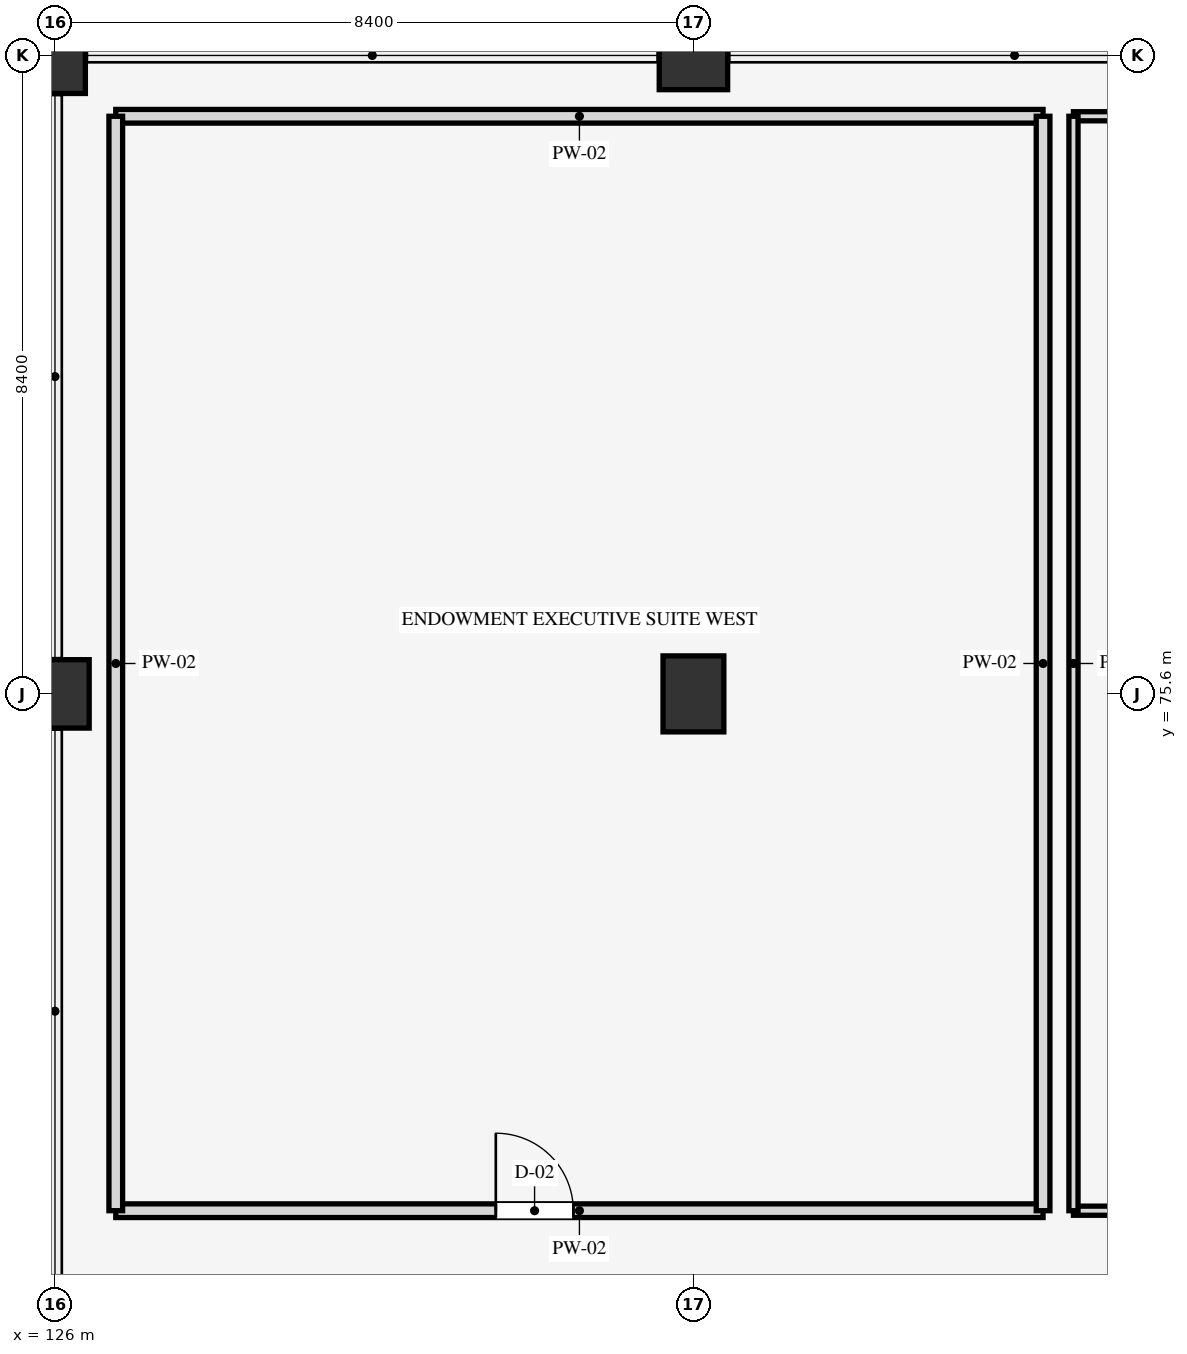
"""IFC4 building model, lengths in metres.
Left out: names, types, materials, properties, quantities, classifications, styles, units other than length and angle.
Written with IfcOpenShell. Run it as: python <this file> out.ifc"""

import sys

from ifc_helpers import new_model, si_unit, direction, frame, frame_2d, origin, origin_2d, place, context, subcontext, project, spatial, rectangle, extrude, element, fill, save


model = new_model("IFC4")
c1 = context("Model", 3, precision=1e-05, world=origin(), true_north=direction((0.0, 1.0)))
c2 = subcontext(c1, "Body", "Model", "MODEL_VIEW")
j1 = project(units=[si_unit("LENGTHUNIT", "METRE"), si_unit("PLANEANGLEUNIT", "RADIAN")], contexts=[c1])
p1 = place(None, origin())
s1 = spatial("IfcSite", under=j1, at=p1, CompositionType="ELEMENT")
p2 = place(p1, origin())
s2 = spatial("IfcBuilding", under=s1, at=p2, CompositionType="ELEMENT")
p3 = place(p2, frame((0.0, 0.0, 61.5)))
s3 = spatial("IfcBuildingStorey", under=s2, at=p3, CompositionType="ELEMENT", Elevation=61.5)
p4 = place(p3, frame((126.0, 75.6, 0.0), z_axis=(0.0, 0.0, 1.0), x_axis=(1.0, 0.0, 0.0)))
e1 = element("IfcColumn", 1, at=p4, inside=s3, PredefinedType="COLUMN", context=c2, shape_type="SweptSolid", body=[
    extrude(rectangle(XDim=0.9, YDim=0.9, at=origin_2d()), origin(), (0.0, 0.0, 1.0), 4.2),
])
for number, where, z_axis, x_axis in (
    (2, (126.0, 84.0, 0.0), (0.0, 0.0, 1.0), (1.0, 0.0, 0.0)),
    (3, (134.4, 75.6, 0.0), (0.0, 0.0, 1.0), (1.0, 0.0, 0.0)),
):
    element("IfcColumn", number, at=place(p3, frame(where, z_axis=z_axis, x_axis=x_axis)), inside=s3, PredefinedType="COLUMN", context=c2, shape_type="SweptSolid", body=[
        extrude(rectangle(XDim=0.8, YDim=1.0, at=origin_2d()), origin(), (0.0, 0.0, 1.0), 4.2),
    ])
p5 = place(p3, frame((134.4, 84.0, 0.0), z_axis=(0.0, 0.0, 1.0), x_axis=(1.0, 0.0, 0.0)))
e4 = element("IfcColumn", 4, at=p5, inside=s3, PredefinedType="COLUMN", context=c2, shape_type="SweptSolid", body=[
    extrude(rectangle(XDim=0.9, YDim=0.9, at=origin_2d()), origin(), (0.0, 0.0, 1.0), 4.2),
])
p6 = place(p3, frame((126.8, 68.8, 0.0), z_axis=(0.0, 0.0, 1.0), x_axis=(1.0, 0.0, 0.0)))
e5 = element("IfcWall", 5, at=p6, inside=s3, PredefinedType="PARTITIONING", context=c2, shape_type="SweptSolid", body=[
    extrude(rectangle(XDim=12.2, YDim=0.18, at=frame_2d((6.1, 0.0))), origin(), (0.0, 0.0, 1.0), 3.24),
])
p7 = place(p6, frame((5.0, 0.0, 0.0)))
e6 = element("IfcOpeningElement", 6, at=p7, cuts=e5, PredefinedType="OPENING", context=c2, shape_type="SweptSolid", body=[
    extrude(rectangle(XDim=1.02, YDim=2.1, at=frame_2d((0.51, 1.05))), frame((0.0, 0.1, 0.0), z_axis=(0.0, -1.0, 0.0), x_axis=(1.0, 0.0, 0.0)), (0.0, 0.0, 1.0), 0.2),
])
p8 = place(p3, frame((126.8, 83.2, 0.0), z_axis=(0.0, 0.0, 1.0), x_axis=(1.0, 0.0, 0.0)))
e7 = element("IfcWall", 7, at=p8, inside=s3, PredefinedType="PARTITIONING", context=c2, shape_type="SweptSolid", body=[
    extrude(rectangle(XDim=12.2, YDim=0.18, at=frame_2d((6.1, 0.0))), origin(), (0.0, 0.0, 1.0), 3.24),
])
for number, where, z_axis, x_axis in (
    (8, (126.8, 68.8, 0.0), (0.0, 0.0, 1.0), (0.0, 1.0, 0.0)),
    (9, (139.0, 68.8, 0.0), (0.0, 0.0, 1.0), (0.0, 1.0, 0.0)),
):
    element("IfcWall", number, at=place(p3, frame(where, z_axis=z_axis, x_axis=x_axis)), inside=s3, PredefinedType="PARTITIONING", context=c2, shape_type="SweptSolid", body=[
        extrude(rectangle(XDim=14.4, YDim=0.18, at=frame_2d((7.2, 0.0))), origin(), (0.0, 0.0, 1.0), 3.24),
    ])
p9 = place(p3, frame((139.4, 68.8, 0.0), z_axis=(0.0, 0.0, 1.0), x_axis=(1.0, 0.0, 0.0)))
e10 = element("IfcWall", 10, at=p9, inside=s3, PredefinedType="PARTITIONING", context=c2, shape_type="SweptSolid", body=[
    extrude(rectangle(XDim=11.4, YDim=0.12, at=frame_2d((5.7, 0.0))), origin(), (0.0, 0.0, 1.0), 3.24),
])
p10 = place(p9, frame((5.0, 0.0, 0.0)))
e11 = element("IfcOpeningElement", 11, at=p10, cuts=e10, PredefinedType="OPENING", context=c2, shape_type="SweptSolid", body=[
    extrude(rectangle(XDim=1.28, YDim=2.16, at=frame_2d((0.64, 1.08))), frame((0.0, 0.07, 0.0), z_axis=(0.0, -1.0, 0.0), x_axis=(1.0, 0.0, 0.0)), (0.0, 0.0, 1.0), 0.14),
])
p11 = place(p3, frame((139.4, 83.2, 0.0), z_axis=(0.0, 0.0, 1.0), x_axis=(1.0, 0.0, 0.0)))
e12 = element("IfcWall", 12, at=p11, inside=s3, PredefinedType="PARTITIONING", context=c2, shape_type="SweptSolid", body=[
    extrude(rectangle(XDim=11.4, YDim=0.12, at=frame_2d((5.7, 0.0))), origin(), (0.0, 0.0, 1.0), 3.24),
])
p12 = place(p3, frame((139.4, 68.8, 0.0), z_axis=(0.0, 0.0, 1.0), x_axis=(0.0, 1.0, 0.0)))
e13 = element("IfcWall", 13, at=p12, inside=s3, PredefinedType="PARTITIONING", context=c2, shape_type="SweptSolid", body=[
    extrude(rectangle(XDim=14.4, YDim=0.12, at=frame_2d((7.2, 0.0))), origin(), (0.0, 0.0, 1.0), 3.24),
])
p13 = place(p7, origin())
e14 = element("IfcDoor", 14, at=p13, inside=s3, OperationType="SINGLE_SWING_LEFT", PredefinedType="DOOR", context=c2, shape_type="SweptSolid", body=[
    extrude(rectangle(XDim=1.02, YDim=2.1, at=frame_2d((0.51, 1.05))), frame((0.0, 0.025, 0.0), z_axis=(0.0, -1.0, 0.0), x_axis=(1.0, 0.0, 0.0)), (0.0, 0.0, 1.0), 0.05),
])
fill(e6, e14)
save(model, sys.argv[1])
